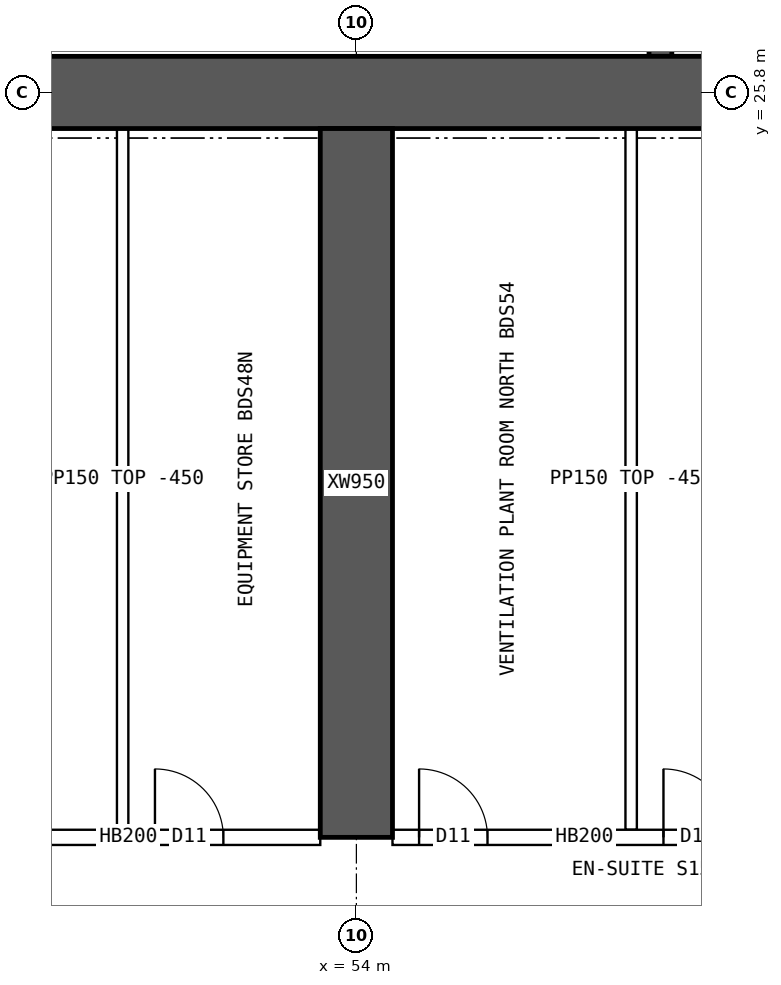
"""IFC4 building model, lengths in metres.
Left out: names, types, materials, properties, quantities, classifications, styles, units other than length and angle.
Written with IfcOpenShell. Run it as: python <this file> out.ifc"""

import sys

from ifc_helpers import new_model, si_unit, direction, frame, frame_2d, origin, place, context, subcontext, project, spatial, rectangle, extrude, element, fill, save


model = new_model("IFC4")
c1 = context("Model", 3, precision=1e-05, world=origin(), true_north=direction((0.0, 1.0)))
c2 = subcontext(c1, "Body", "Model", "MODEL_VIEW")
j1 = project(units=[si_unit("LENGTHUNIT", "METRE"), si_unit("PLANEANGLEUNIT", "RADIAN")], contexts=[c1])
p1 = place(None, origin())
s1 = spatial("IfcSite", under=j1, at=p1, CompositionType="ELEMENT")
p2 = place(p1, origin())
s2 = spatial("IfcBuilding", under=s1, at=p2, CompositionType="ELEMENT")
p3 = place(p2, frame((0.0, 0.0, 95.65)))
s3 = spatial("IfcBuildingStorey", under=s2, at=p3, CompositionType="ELEMENT", Elevation=95.65)
p4 = place(p3, frame((18.0, 25.8, 0.0), z_axis=(0.0, 0.0, 1.0), x_axis=(1.0, 0.0, 0.0)))
e1 = element("IfcWall", 1, at=p4, inside=s3, PredefinedType="SHEAR", context=c2, shape_type="SweptSolid", body=[
    extrude(rectangle(XDim=48.0, YDim=0.95, at=frame_2d((24.0, 0.0))), origin(), (0.0, 0.0, 1.0), 3.75),
])
p5 = place(p3, frame((58.0, 26.275, 0.0), z_axis=(0.0, 0.0, 1.0), x_axis=(0.0, 1.0, 0.0)))
e2 = element("IfcWall", 2, at=p5, inside=s3, PredefinedType="SHEAR", context=c2, shape_type="SweptSolid", body=[
    extrude(rectangle(XDim=3.975, YDim=0.3, at=frame_2d((1.988, 0.0))), origin(), (0.0, 0.0, 1.0), 3.75),
])
p6 = place(p3, frame((54.0, 16.0, 0.0), z_axis=(0.0, 0.0, 1.0), x_axis=(0.0, 1.0, 0.0)))
e3 = element("IfcWall", 3, at=p6, inside=s3, PredefinedType="SHEAR", context=c2, shape_type="SweptSolid", body=[
    extrude(rectangle(XDim=9.325, YDim=0.95, at=frame_2d((4.663, 0.0))), origin(), (0.0, 0.0, 1.0), 3.75),
])
p7 = place(p3, frame((48.475, 16.0, 0.0), z_axis=(0.0, 0.0, 1.0), x_axis=(1.0, 0.0, 0.0)))
e4 = element("IfcWall", 4, at=p7, inside=s3, PredefinedType="SOLIDWALL", context=c2, shape_type="SweptSolid", body=[
    extrude(rectangle(XDim=5.05, YDim=0.2, at=frame_2d((2.525, 0.0))), origin(), (0.0, 0.0, 1.0), 3.3),
])
p8 = place(p7, frame((0.15, 0.0, 0.0)))
e5 = element("IfcOpeningElement", 5, at=p8, cuts=e4, PredefinedType="OPENING", context=c2, shape_type="SweptSolid", body=[
    extrude(rectangle(XDim=0.9, YDim=2.1, at=frame_2d((0.45, 1.05))), frame((0.0, 0.11, 0.0), z_axis=(0.0, -1.0, 0.0), x_axis=(1.0, 0.0, 0.0)), (0.0, 0.0, 1.0), 0.22),
])
p9 = place(p7, frame((2.875, 0.0, 0.0)))
e6 = element("IfcOpeningElement", 6, at=p9, cuts=e4, PredefinedType="OPENING", context=c2, shape_type="SweptSolid", body=[
    extrude(rectangle(XDim=0.9, YDim=2.1, at=frame_2d((0.45, 1.05))), frame((0.0, 0.11, 0.0), z_axis=(0.0, -1.0, 0.0), x_axis=(1.0, 0.0, 0.0)), (0.0, 0.0, 1.0), 0.22),
])
p10 = place(p3, frame((54.475, 16.0, 0.0), z_axis=(0.0, 0.0, 1.0), x_axis=(1.0, 0.0, 0.0)))
e7 = element("IfcWall", 7, at=p10, inside=s3, PredefinedType="SOLIDWALL", context=c2, shape_type="SweptSolid", body=[
    extrude(rectangle(XDim=5.05, YDim=0.2, at=frame_2d((2.525, 0.0))), origin(), (0.0, 0.0, 1.0), 3.3),
])
p11 = place(p10, frame((0.35, 0.0, 0.0)))
e8 = element("IfcOpeningElement", 8, at=p11, cuts=e7, PredefinedType="OPENING", context=c2, shape_type="SweptSolid", body=[
    extrude(rectangle(XDim=0.9, YDim=2.1, at=frame_2d((0.45, 1.05))), frame((0.0, 0.11, 0.0), z_axis=(0.0, -1.0, 0.0), x_axis=(1.0, 0.0, 0.0)), (0.0, 0.0, 1.0), 0.22),
])
p12 = place(p10, frame((3.565, 0.0, 0.0)))
e9 = element("IfcOpeningElement", 9, at=p12, cuts=e7, PredefinedType="OPENING", context=c2, shape_type="SweptSolid", body=[
    extrude(rectangle(XDim=0.9, YDim=2.1, at=frame_2d((0.45, 1.05))), frame((0.0, 0.11, 0.0), z_axis=(0.0, -1.0, 0.0), x_axis=(1.0, 0.0, 0.0)), (0.0, 0.0, 1.0), 0.22),
])
for number, where, z_axis, x_axis in (
    (10, (50.925, 16.1, 0.0), (0.0, 0.0, 1.0), (0.0, 1.0, 0.0)),
    (11, (57.615, 16.1, 0.0), (0.0, 0.0, 1.0), (0.0, 1.0, 0.0)),
):
    element("IfcWall", number, at=place(p3, frame(where, z_axis=z_axis, x_axis=x_axis)), inside=s3, PredefinedType="PARTITIONING", context=c2, shape_type="SweptSolid", body=[
        extrude(rectangle(XDim=9.225, YDim=0.15, at=frame_2d((4.612, 0.0))), origin(), (0.0, 0.0, 1.0), 3.3),
    ])
p13 = place(p9, origin())
e12 = element("IfcDoor", 12, at=p13, inside=s3, OperationType="SINGLE_SWING_LEFT", PredefinedType="DOOR", context=c2, shape_type="SweptSolid", body=[
    extrude(rectangle(XDim=0.9, YDim=2.1, at=frame_2d((0.45, 1.05))), frame((0.0, 0.025, 0.0), z_axis=(0.0, -1.0, 0.0), x_axis=(1.0, 0.0, 0.0)), (0.0, 0.0, 1.0), 0.05),
])
fill(e6, e12)
p14 = place(p11, origin())
e13 = element("IfcDoor", 13, at=p14, inside=s3, OperationType="SINGLE_SWING_LEFT", PredefinedType="DOOR", context=c2, shape_type="SweptSolid", body=[
    extrude(rectangle(XDim=0.9, YDim=2.1, at=frame_2d((0.45, 1.05))), frame((0.0, 0.025, 0.0), z_axis=(0.0, -1.0, 0.0), x_axis=(1.0, 0.0, 0.0)), (0.0, 0.0, 1.0), 0.05),
])
fill(e8, e13)
p15 = place(p12, origin())
e14 = element("IfcDoor", 14, at=p15, inside=s3, OperationType="SINGLE_SWING_LEFT", PredefinedType="DOOR", context=c2, shape_type="SweptSolid", body=[
    extrude(rectangle(XDim=0.9, YDim=2.1, at=frame_2d((0.45, 1.05))), frame((0.0, 0.025, 0.0), z_axis=(0.0, -1.0, 0.0), x_axis=(1.0, 0.0, 0.0)), (0.0, 0.0, 1.0), 0.05),
])
fill(e9, e14)
save(model, sys.argv[1])
